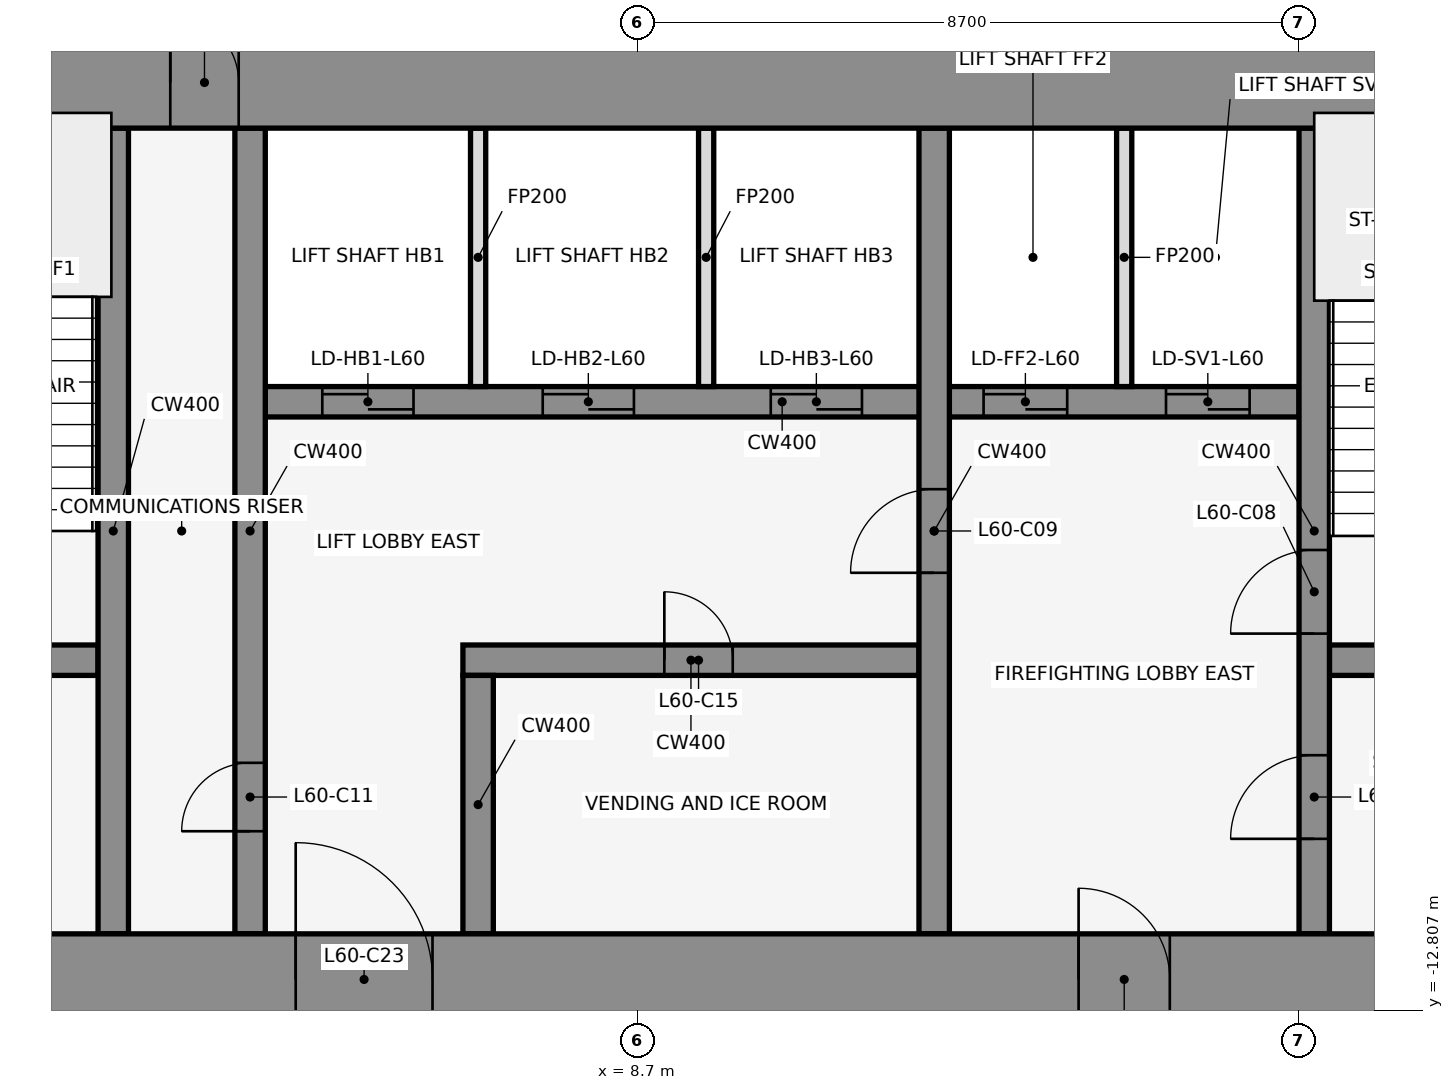
"""IFC4 building model, lengths in metres.
Left out: names, types, materials, properties, quantities, classifications, styles, units other than length and angle.
Written with IfcOpenShell. Run it as: python <this file> out.ifc"""

import sys

from ifc_helpers import new_model, si_unit, direction, frame, frame_2d, origin, place, context, subcontext, project, spatial, rectangle, extrude, element, fill, save


model = new_model("IFC4")
c1 = context("Model", 3, precision=1e-05, world=origin(), true_north=direction((0.0, 1.0)))
c2 = subcontext(c1, "Body", "Model", "MODEL_VIEW")
j1 = project(units=[si_unit("LENGTHUNIT", "METRE"), si_unit("PLANEANGLEUNIT", "RADIAN")], contexts=[c1])
p1 = place(None, origin())
s1 = spatial("IfcSite", under=j1, at=p1, CompositionType="ELEMENT")
p2 = place(p1, origin())
s2 = spatial("IfcBuilding", under=s1, at=p2, CompositionType="ELEMENT")
p3 = place(p2, frame((0.0, 0.0, 266.6)))
s3 = spatial("IfcBuildingStorey", under=s2, at=p3, CompositionType="ELEMENT", Elevation=266.6)
for number, where, z_axis, x_axis in (
    (1, (16.432, -0.105, 0.0), (0.0, 0.0, 1.0), (-0.84, 0.543, 0.0)),
    (2, (1.901, 1.08, 0.0), (0.0, 0.0, 1.0), (-0.84, -0.543, 0.0)),
):
    element("IfcWall", number, at=place(p3, frame(where, z_axis=z_axis, x_axis=x_axis)), inside=s3, PredefinedType="STANDARD", context=c2, shape_type="SweptSolid", body=[
        extrude(rectangle(XDim=2.183, YDim=0.25, at=frame_2d((1.091, 0.0))), origin(), (0.0, 0.0, 1.0), 4.05),
    ])
p4 = place(p3, frame((-1.6, -8.2, 0.0), z_axis=(0.0, 0.0, 1.0), x_axis=(1.0, 0.0, 0.0)))
e3 = element("IfcWall", 3, at=p4, inside=s3, PredefinedType="SHEAR", context=c2, shape_type="SweptSolid", body=[
    extrude(rectangle(XDim=3.2, YDim=0.4, at=frame_2d((1.6, 0.0))), origin(), (0.0, 0.0, 1.0), 4.2),
])
p5 = place(p4, frame((1.05, 0.0, 0.0)))
e4 = element("IfcOpeningElement", 4, at=p5, cuts=e3, PredefinedType="OPENING", context=c2, shape_type="SweptSolid", body=[
    extrude(rectangle(XDim=1.2, YDim=2.1, at=frame_2d((0.6, 1.05))), frame((0.0, 0.212, 0.0), z_axis=(0.0, -1.0, 0.0), x_axis=(1.0, 0.0, 0.0)), (0.0, 0.0, 1.0), 0.424),
])
p6 = place(p3, frame((6.4, -8.2, 0.0), z_axis=(0.0, 0.0, 1.0), x_axis=(1.0, 0.0, 0.0)))
e5 = element("IfcWall", 5, at=p6, inside=s3, PredefinedType="SHEAR", context=c2, shape_type="SweptSolid", body=[
    extrude(rectangle(XDim=6.0, YDim=0.4, at=frame_2d((3.0, 0.0))), origin(), (0.0, 0.0, 1.0), 4.2),
])
p7 = place(p6, frame((2.65, 0.0, 0.0)))
e6 = element("IfcOpeningElement", 6, at=p7, cuts=e5, PredefinedType="OPENING", context=c2, shape_type="SweptSolid", body=[
    extrude(rectangle(XDim=0.9, YDim=2.1, at=frame_2d((0.45, 1.05))), frame((0.0, 0.212, 0.0), z_axis=(0.0, -1.0, 0.0), x_axis=(1.0, 0.0, 0.0)), (0.0, 0.0, 1.0), 0.424),
])
p8 = place(p3, frame((17.8, -8.2, 0.0), z_axis=(0.0, 0.0, 1.0), x_axis=(1.0, 0.0, 0.0)))
e7 = element("IfcWall", 7, at=p8, inside=s3, PredefinedType="SHEAR", context=c2, shape_type="SweptSolid", body=[
    extrude(rectangle(XDim=3.0, YDim=0.4, at=frame_2d((1.5, 0.0))), origin(), (0.0, 0.0, 1.0), 4.2),
])
p9 = place(p8, frame((0.85, 0.0, 0.0)))
e8 = element("IfcOpeningElement", 8, at=p9, cuts=e7, PredefinedType="OPENING", context=c2, shape_type="SweptSolid", body=[
    extrude(rectangle(XDim=1.2, YDim=2.1, at=frame_2d((0.6, 1.05))), frame((0.0, 0.212, 0.0), z_axis=(0.0, -1.0, 0.0), x_axis=(1.0, 0.0, 0.0)), (0.0, 0.0, 1.0), 0.424),
])
p10 = place(p3, frame((3.8, -4.8, 0.0), z_axis=(0.0, 0.0, 1.0), x_axis=(1.0, 0.0, 0.0)))
e9 = element("IfcWall", 9, at=p10, inside=s3, PredefinedType="SHEAR", context=c2, shape_type="SweptSolid", body=[
    extrude(rectangle(XDim=13.6, YDim=0.4, at=frame_2d((6.8, 0.0))), origin(), (0.0, 0.0, 1.0), 4.2),
])
p11 = place(p10, frame((0.75, 0.0, 0.0)))
e10 = element("IfcOpeningElement", 10, at=p11, cuts=e9, PredefinedType="OPENING", context=c2, shape_type="SweptSolid", body=[
    extrude(rectangle(XDim=1.2, YDim=2.1, at=frame_2d((0.6, 1.05))), frame((0.0, 0.212, 0.0), z_axis=(0.0, -1.0, 0.0), x_axis=(1.0, 0.0, 0.0)), (0.0, 0.0, 1.0), 0.424),
])
p12 = place(p10, frame((3.65, 0.0, 0.0)))
e11 = element("IfcOpeningElement", 11, at=p12, cuts=e9, PredefinedType="OPENING", context=c2, shape_type="SweptSolid", body=[
    extrude(rectangle(XDim=1.2, YDim=2.1, at=frame_2d((0.6, 1.05))), frame((0.0, 0.212, 0.0), z_axis=(0.0, -1.0, 0.0), x_axis=(1.0, 0.0, 0.0)), (0.0, 0.0, 1.0), 0.424),
])
p13 = place(p10, frame((6.65, 0.0, 0.0)))
e12 = element("IfcOpeningElement", 12, at=p13, cuts=e9, PredefinedType="OPENING", context=c2, shape_type="SweptSolid", body=[
    extrude(rectangle(XDim=1.2, YDim=2.1, at=frame_2d((0.6, 1.05))), frame((0.0, 0.212, 0.0), z_axis=(0.0, -1.0, 0.0), x_axis=(1.0, 0.0, 0.0)), (0.0, 0.0, 1.0), 0.424),
])
p14 = place(p10, frame((9.45, 0.0, 0.0)))
e13 = element("IfcOpeningElement", 13, at=p14, cuts=e9, PredefinedType="OPENING", context=c2, shape_type="SweptSolid", body=[
    extrude(rectangle(XDim=1.1, YDim=2.1, at=frame_2d((0.55, 1.05))), frame((0.0, 0.212, 0.0), z_axis=(0.0, -1.0, 0.0), x_axis=(1.0, 0.0, 0.0)), (0.0, 0.0, 1.0), 0.424),
])
p15 = place(p10, frame((11.85, 0.0, 0.0)))
e14 = element("IfcOpeningElement", 14, at=p15, cuts=e9, PredefinedType="OPENING", context=c2, shape_type="SweptSolid", body=[
    extrude(rectangle(XDim=1.1, YDim=2.1, at=frame_2d((0.55, 1.05))), frame((0.0, 0.212, 0.0), z_axis=(0.0, -1.0, 0.0), x_axis=(1.0, 0.0, 0.0)), (0.0, 0.0, 1.0), 0.424),
])
p16 = place(p3, frame((1.8, -11.8, 0.0), z_axis=(0.0, 0.0, 1.0), x_axis=(0.0, 1.0, 0.0)))
e15 = element("IfcWall", 15, at=p16, inside=s3, PredefinedType="SHEAR", context=c2, shape_type="SweptSolid", body=[
    extrude(rectangle(XDim=10.6, YDim=0.4, at=frame_2d((5.3, 0.0))), origin(), (0.0, 0.0, 1.0), 4.2),
])
p17 = place(p3, frame((3.6, -11.8, 0.0), z_axis=(0.0, 0.0, 1.0), x_axis=(0.0, 1.0, 0.0)))
e16 = element("IfcWall", 16, at=p17, inside=s3, PredefinedType="SHEAR", context=c2, shape_type="SweptSolid", body=[
    extrude(rectangle(XDim=10.6, YDim=0.4, at=frame_2d((5.3, 0.0))), origin(), (0.0, 0.0, 1.0), 4.2),
])
p18 = place(p17, frame((1.35, 0.0, 0.0)))
e17 = element("IfcOpeningElement", 17, at=p18, cuts=e16, PredefinedType="OPENING", context=c2, shape_type="SweptSolid", body=[
    extrude(rectangle(XDim=0.9, YDim=2.1, at=frame_2d((0.45, 1.05))), frame((0.0, 0.212, 0.0), z_axis=(0.0, -1.0, 0.0), x_axis=(1.0, 0.0, 0.0)), (0.0, 0.0, 1.0), 0.424),
])
p19 = place(p3, frame((6.6, -11.8, 0.0), z_axis=(0.0, 0.0, 1.0), x_axis=(0.0, 1.0, 0.0)))
e18 = element("IfcWall", 18, at=p19, inside=s3, PredefinedType="SHEAR", context=c2, shape_type="SweptSolid", body=[
    extrude(rectangle(XDim=3.4, YDim=0.4, at=frame_2d((1.7, 0.0))), origin(), (0.0, 0.0, 1.0), 4.2),
])
for number, where, z_axis, x_axis in (
    (19, (6.6, -4.6, 0.0), (0.0, 0.0, 1.0), (0.0, 1.0, 0.0)),
    (20, (9.6, -4.6, 0.0), (0.0, 0.0, 1.0), (0.0, 1.0, 0.0)),
):
    element("IfcWall", number, at=place(p3, frame(where, z_axis=z_axis, x_axis=x_axis)), inside=s3, PredefinedType="PARTITIONING", context=c2, shape_type="SweptSolid", body=[
        extrude(rectangle(XDim=3.4, YDim=0.2, at=frame_2d((1.7, 0.0))), origin(), (0.0, 0.0, 1.0), 3.118),
    ])
p20 = place(p3, frame((12.6, -11.8, 0.0), z_axis=(0.0, 0.0, 1.0), x_axis=(0.0, 1.0, 0.0)))
e21 = element("IfcWall", 21, at=p20, inside=s3, PredefinedType="SHEAR", context=c2, shape_type="SweptSolid", body=[
    extrude(rectangle(XDim=10.6, YDim=0.4, at=frame_2d((5.3, 0.0))), origin(), (0.0, 0.0, 1.0), 4.2),
])
p21 = place(p20, frame((4.75, 0.0, 0.0)))
e22 = element("IfcOpeningElement", 22, at=p21, cuts=e21, PredefinedType="OPENING", context=c2, shape_type="SweptSolid", body=[
    extrude(rectangle(XDim=1.1, YDim=2.1, at=frame_2d((0.55, 1.05))), frame((0.0, 0.212, 0.0), z_axis=(0.0, -1.0, 0.0), x_axis=(1.0, 0.0, 0.0)), (0.0, 0.0, 1.0), 0.424),
])
p22 = place(p3, frame((15.1, -4.6, 0.0), z_axis=(0.0, 0.0, 1.0), x_axis=(0.0, 1.0, 0.0)))
e23 = element("IfcWall", 23, at=p22, inside=s3, PredefinedType="PARTITIONING", context=c2, shape_type="SweptSolid", body=[
    extrude(rectangle(XDim=3.4, YDim=0.2, at=frame_2d((1.7, 0.0))), origin(), (0.0, 0.0, 1.0), 3.118),
])
p23 = place(p3, frame((17.6, -11.8, 0.0), z_axis=(0.0, 0.0, 1.0), x_axis=(0.0, 1.0, 0.0)))
e24 = element("IfcWall", 24, at=p23, inside=s3, PredefinedType="SHEAR", context=c2, shape_type="SweptSolid", body=[
    extrude(rectangle(XDim=10.6, YDim=0.4, at=frame_2d((5.3, 0.0))), origin(), (0.0, 0.0, 1.0), 4.2),
])
p24 = place(p23, frame((1.25, 0.0, 0.0)))
e25 = element("IfcOpeningElement", 25, at=p24, cuts=e24, PredefinedType="OPENING", context=c2, shape_type="SweptSolid", body=[
    extrude(rectangle(XDim=1.1, YDim=2.1, at=frame_2d((0.55, 1.05))), frame((0.0, 0.212, 0.0), z_axis=(0.0, -1.0, 0.0), x_axis=(1.0, 0.0, 0.0)), (0.0, 0.0, 1.0), 0.424),
])
p25 = place(p23, frame((3.95, 0.0, 0.0)))
e26 = element("IfcOpeningElement", 26, at=p25, cuts=e24, PredefinedType="OPENING", context=c2, shape_type="SweptSolid", body=[
    extrude(rectangle(XDim=1.1, YDim=2.1, at=frame_2d((0.55, 1.05))), frame((0.0, 0.212, 0.0), z_axis=(0.0, -1.0, 0.0), x_axis=(1.0, 0.0, 0.0)), (0.0, 0.0, 1.0), 0.424),
])
p26 = place(p3, frame((-22.0, -0.6, 0.0), z_axis=(0.0, 0.0, 1.0), x_axis=(1.0, 0.0, 0.0)))
e27 = element("IfcWall", 27, at=p26, inside=s3, PredefinedType="SHEAR", context=c2, shape_type="SweptSolid", body=[
    extrude(rectangle(XDim=44.0, YDim=1.2, at=frame_2d((22.0, 0.0))), origin(), (0.0, 0.0, 1.0), 4.2),
])
p27 = place(p26, frame((18.55, 0.0, 0.0)))
e28 = element("IfcOpeningElement", 28, at=p27, cuts=e27, PredefinedType="OPENING", context=c2, shape_type="SweptSolid", body=[
    extrude(rectangle(XDim=0.9, YDim=2.1, at=frame_2d((0.45, 1.05))), frame((0.0, 0.612, 0.0), z_axis=(0.0, -1.0, 0.0), x_axis=(1.0, 0.0, 0.0)), (0.0, 0.0, 1.0), 1.224),
])
p28 = place(p26, frame((24.55, 0.0, 0.0)))
e29 = element("IfcOpeningElement", 29, at=p28, cuts=e27, PredefinedType="OPENING", context=c2, shape_type="SweptSolid", body=[
    extrude(rectangle(XDim=0.9, YDim=2.1, at=frame_2d((0.45, 1.05))), frame((0.0, 0.612, 0.0), z_axis=(0.0, -1.0, 0.0), x_axis=(1.0, 0.0, 0.0)), (0.0, 0.0, 1.0), 1.224),
])
p29 = place(p3, frame((-22.0, -12.4, 0.0), z_axis=(0.0, 0.0, 1.0), x_axis=(1.0, 0.0, 0.0)))
e30 = element("IfcWall", 30, at=p29, inside=s3, PredefinedType="SHEAR", context=c2, shape_type="SweptSolid", body=[
    extrude(rectangle(XDim=44.0, YDim=1.2, at=frame_2d((22.0, 0.0))), origin(), (0.0, 0.0, 1.0), 4.2),
])
p30 = place(p29, frame((2.2, 0.0, 0.0)))
e31 = element("IfcOpeningElement", 31, at=p30, cuts=e30, PredefinedType="OPENING", context=c2, shape_type="SweptSolid", body=[
    extrude(rectangle(XDim=1.2, YDim=2.1, at=frame_2d((0.6, 1.05))), frame((0.0, 0.612, 0.0), z_axis=(0.0, -1.0, 0.0), x_axis=(1.0, 0.0, 0.0)), (0.0, 0.0, 1.0), 1.224),
])
p31 = place(p29, frame((21.4, 0.0, 0.0)))
e32 = element("IfcOpeningElement", 32, at=p31, cuts=e30, PredefinedType="OPENING", context=c2, shape_type="SweptSolid", body=[
    extrude(rectangle(XDim=1.2, YDim=2.1, at=frame_2d((0.6, 1.05))), frame((0.0, 0.612, 0.0), z_axis=(0.0, -1.0, 0.0), x_axis=(1.0, 0.0, 0.0)), (0.0, 0.0, 1.0), 1.224),
])
p32 = place(p29, frame((40.6, 0.0, 0.0)))
e33 = element("IfcOpeningElement", 33, at=p32, cuts=e30, PredefinedType="OPENING", context=c2, shape_type="SweptSolid", body=[
    extrude(rectangle(XDim=1.2, YDim=2.1, at=frame_2d((0.6, 1.05))), frame((0.0, 0.612, 0.0), z_axis=(0.0, -1.0, 0.0), x_axis=(1.0, 0.0, 0.0)), (0.0, 0.0, 1.0), 1.224),
])
p33 = place(p29, frame((16.0, 0.0, 0.0)))
e34 = element("IfcOpeningElement", 34, at=p33, cuts=e30, PredefinedType="OPENING", context=c2, shape_type="SweptSolid", body=[
    extrude(rectangle(XDim=1.8, YDim=2.1, at=frame_2d((0.9, 1.05))), frame((0.0, 0.612, 0.0), z_axis=(0.0, -1.0, 0.0), x_axis=(1.0, 0.0, 0.0)), (0.0, 0.0, 1.0), 1.224),
])
p34 = place(p29, frame((6.3, 0.0, 0.0)))
e35 = element("IfcOpeningElement", 35, at=p34, cuts=e30, PredefinedType="OPENING", context=c2, shape_type="SweptSolid", body=[
    extrude(rectangle(XDim=1.2, YDim=2.1, at=frame_2d((0.6, 1.05))), frame((0.0, 0.612, 0.0), z_axis=(0.0, -1.0, 0.0), x_axis=(1.0, 0.0, 0.0)), (0.0, 0.0, 1.0), 1.224),
])
p35 = place(p29, frame((26.2, 0.0, 0.0)))
e36 = element("IfcOpeningElement", 36, at=p35, cuts=e30, PredefinedType="OPENING", context=c2, shape_type="SweptSolid", body=[
    extrude(rectangle(XDim=1.8, YDim=2.1, at=frame_2d((0.9, 1.05))), frame((0.0, 0.612, 0.0), z_axis=(0.0, -1.0, 0.0), x_axis=(1.0, 0.0, 0.0)), (0.0, 0.0, 1.0), 1.224),
])
p36 = place(p29, frame((36.5, 0.0, 0.0)))
e37 = element("IfcOpeningElement", 37, at=p36, cuts=e30, PredefinedType="OPENING", context=c2, shape_type="SweptSolid", body=[
    extrude(rectangle(XDim=1.2, YDim=2.1, at=frame_2d((0.6, 1.05))), frame((0.0, 0.612, 0.0), z_axis=(0.0, -1.0, 0.0), x_axis=(1.0, 0.0, 0.0)), (0.0, 0.0, 1.0), 1.224),
])
p37 = place(p24, origin())
e38 = element("IfcDoor", 38, at=p37, inside=s3, OperationType="SINGLE_SWING_LEFT", PredefinedType="DOOR", context=c2, shape_type="SweptSolid", body=[
    extrude(rectangle(XDim=1.1, YDim=2.1, at=frame_2d((0.55, 1.05))), frame((0.0, 0.025, 0.0), z_axis=(0.0, -1.0, 0.0), x_axis=(1.0, 0.0, 0.0)), (0.0, 0.0, 1.0), 0.05),
])
fill(e25, e38)
p38 = place(p11, origin())
e39 = element("IfcDoor", 39, at=p38, inside=s3, OperationType="DOUBLE_DOOR_SLIDING", PredefinedType="DOOR", context=c2, shape_type="SweptSolid", body=[
    extrude(rectangle(XDim=1.2, YDim=2.1, at=frame_2d((0.6, 1.05))), frame((0.0, 0.025, 0.0), z_axis=(0.0, -1.0, 0.0), x_axis=(1.0, 0.0, 0.0)), (0.0, 0.0, 1.0), 0.05),
])
fill(e10, e39)
p39 = place(p12, origin())
e40 = element("IfcDoor", 40, at=p39, inside=s3, OperationType="DOUBLE_DOOR_SLIDING", PredefinedType="DOOR", context=c2, shape_type="SweptSolid", body=[
    extrude(rectangle(XDim=1.2, YDim=2.1, at=frame_2d((0.6, 1.05))), frame((0.0, 0.025, 0.0), z_axis=(0.0, -1.0, 0.0), x_axis=(1.0, 0.0, 0.0)), (0.0, 0.0, 1.0), 0.05),
])
fill(e11, e40)
p40 = place(p13, origin())
e41 = element("IfcDoor", 41, at=p40, inside=s3, OperationType="DOUBLE_DOOR_SLIDING", PredefinedType="DOOR", context=c2, shape_type="SweptSolid", body=[
    extrude(rectangle(XDim=1.2, YDim=2.1, at=frame_2d((0.6, 1.05))), frame((0.0, 0.025, 0.0), z_axis=(0.0, -1.0, 0.0), x_axis=(1.0, 0.0, 0.0)), (0.0, 0.0, 1.0), 0.05),
])
fill(e12, e41)
p41 = place(p14, origin())
e42 = element("IfcDoor", 42, at=p41, inside=s3, OperationType="DOUBLE_DOOR_SLIDING", PredefinedType="DOOR", context=c2, shape_type="SweptSolid", body=[
    extrude(rectangle(XDim=1.1, YDim=2.1, at=frame_2d((0.55, 1.05))), frame((0.0, 0.025, 0.0), z_axis=(0.0, -1.0, 0.0), x_axis=(1.0, 0.0, 0.0)), (0.0, 0.0, 1.0), 0.05),
])
fill(e13, e42)
p42 = place(p15, origin())
e43 = element("IfcDoor", 43, at=p42, inside=s3, OperationType="DOUBLE_DOOR_SLIDING", PredefinedType="DOOR", context=c2, shape_type="SweptSolid", body=[
    extrude(rectangle(XDim=1.1, YDim=2.1, at=frame_2d((0.55, 1.05))), frame((0.0, 0.025, 0.0), z_axis=(0.0, -1.0, 0.0), x_axis=(1.0, 0.0, 0.0)), (0.0, 0.0, 1.0), 0.05),
])
fill(e14, e43)
p43 = place(p25, origin())
e44 = element("IfcDoor", 44, at=p43, inside=s3, OperationType="SINGLE_SWING_RIGHT", PredefinedType="DOOR", context=c2, shape_type="SweptSolid", body=[
    extrude(rectangle(XDim=1.1, YDim=2.1, at=frame_2d((0.55, 1.05))), frame((0.0, 0.025, 0.0), z_axis=(0.0, -1.0, 0.0), x_axis=(1.0, 0.0, 0.0)), (0.0, 0.0, 1.0), 0.05),
])
fill(e26, e44)
p44 = place(p21, frame((1.1, 0.0, 0.0), z_axis=(0.0, 0.0, 1.0), x_axis=(-1.0, 0.0, 0.0)))
e45 = element("IfcDoor", 45, at=p44, inside=s3, OperationType="SINGLE_SWING_RIGHT", PredefinedType="DOOR", context=c2, shape_type="SweptSolid", body=[
    extrude(rectangle(XDim=1.1, YDim=2.1, at=frame_2d((0.55, 1.05))), frame((0.0, 0.025, 0.0), z_axis=(0.0, -1.0, 0.0), x_axis=(1.0, 0.0, 0.0)), (0.0, 0.0, 1.0), 0.05),
])
fill(e22, e45)
p45 = place(p18, origin())
e46 = element("IfcDoor", 46, at=p45, inside=s3, OperationType="SINGLE_SWING_LEFT", PredefinedType="DOOR", context=c2, shape_type="SweptSolid", body=[
    extrude(rectangle(XDim=0.9, YDim=2.1, at=frame_2d((0.45, 1.05))), frame((0.0, 0.025, 0.0), z_axis=(0.0, -1.0, 0.0), x_axis=(1.0, 0.0, 0.0)), (0.0, 0.0, 1.0), 0.05),
])
fill(e17, e46)
p46 = place(p7, frame((0.9, 0.0, 0.0), z_axis=(0.0, 0.0, 1.0), x_axis=(-1.0, 0.0, 0.0)))
e47 = element("IfcDoor", 47, at=p46, inside=s3, OperationType="SINGLE_SWING_RIGHT", PredefinedType="DOOR", context=c2, shape_type="SweptSolid", body=[
    extrude(rectangle(XDim=0.9, YDim=2.1, at=frame_2d((0.45, 1.05))), frame((0.0, 0.025, 0.0), z_axis=(0.0, -1.0, 0.0), x_axis=(1.0, 0.0, 0.0)), (0.0, 0.0, 1.0), 0.05),
])
fill(e6, e47)
p47 = place(p28, origin())
e48 = element("IfcDoor", 48, at=p47, inside=s3, OperationType="SINGLE_SWING_LEFT", PredefinedType="DOOR", context=c2, shape_type="SweptSolid", body=[
    extrude(rectangle(XDim=0.9, YDim=2.1, at=frame_2d((0.45, 1.05))), frame((0.0, 0.025, 0.0), z_axis=(0.0, -1.0, 0.0), x_axis=(1.0, 0.0, 0.0)), (0.0, 0.0, 1.0), 0.05),
])
fill(e29, e48)
p48 = place(p35, origin())
e49 = element("IfcDoor", 49, at=p48, inside=s3, OperationType="SINGLE_SWING_LEFT", PredefinedType="DOOR", context=c2, shape_type="SweptSolid", body=[
    extrude(rectangle(XDim=1.8, YDim=2.1, at=frame_2d((0.9, 1.05))), frame((0.0, 0.025, 0.0), z_axis=(0.0, -1.0, 0.0), x_axis=(1.0, 0.0, 0.0)), (0.0, 0.0, 1.0), 0.05),
])
fill(e36, e49)
p49 = place(p36, frame((1.2, 0.0, 0.0), z_axis=(0.0, 0.0, 1.0), x_axis=(-1.0, 0.0, 0.0)))
e50 = element("IfcDoor", 50, at=p49, inside=s3, OperationType="SINGLE_SWING_RIGHT", PredefinedType="DOOR", context=c2, shape_type="SweptSolid", body=[
    extrude(rectangle(XDim=1.2, YDim=2.1, at=frame_2d((0.6, 1.05))), frame((0.0, 0.025, 0.0), z_axis=(0.0, -1.0, 0.0), x_axis=(1.0, 0.0, 0.0)), (0.0, 0.0, 1.0), 0.05),
])
fill(e37, e50)
save(model, sys.argv[1])
